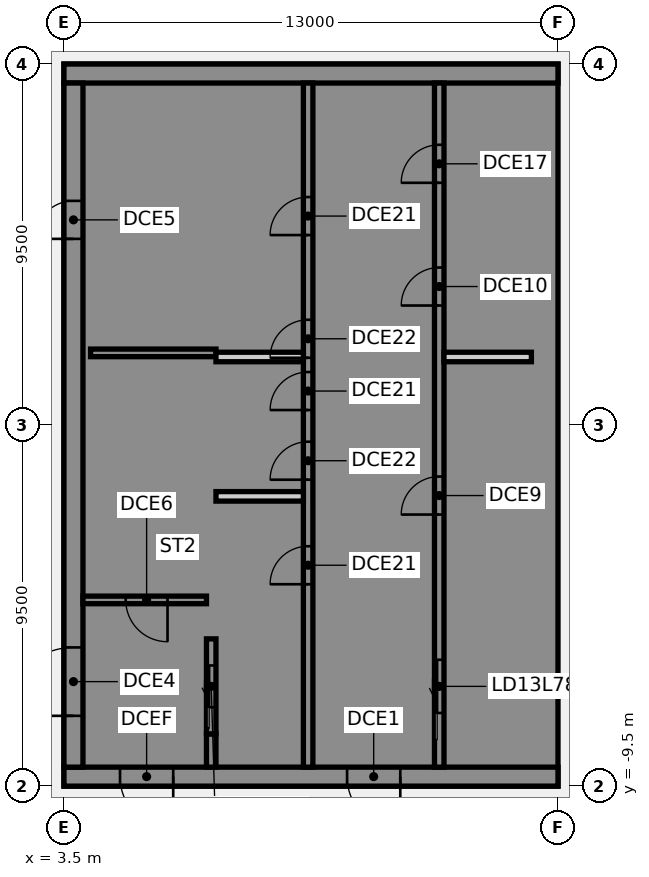
"""IFC4 building model, lengths in metres.
Left out: names, types, materials, properties, quantities, classifications, styles, units other than length and angle.
Written with IfcOpenShell. Run it as: python <this file> out.ifc"""

import sys

from ifc_helpers import new_model, si_unit, direction, frame, frame_2d, origin, place, context, subcontext, project, spatial, polyline, rectangle, outline, extrude, element, fill, save


model = new_model("IFC4")
c1 = context("Model", 3, precision=1e-05, world=origin(), true_north=direction((0.0, 1.0)))
c2 = subcontext(c1, "Body", "Model", "MODEL_VIEW")
j1 = project(units=[si_unit("LENGTHUNIT", "METRE"), si_unit("PLANEANGLEUNIT", "RADIAN")], contexts=[c1])
p1 = place(None, origin())
s1 = spatial("IfcSite", under=j1, at=p1, CompositionType="ELEMENT")
p2 = place(p1, origin())
s2 = spatial("IfcBuilding", under=s1, at=p2, CompositionType="ELEMENT")
p3 = place(p2, frame((0.0, 0.0, 317.4)))
s3 = spatial("IfcBuildingStorey", under=s2, at=p3, CompositionType="ELEMENT", Elevation=317.4)
p4 = place(p3, frame((16.5, -9.25, 0.0), z_axis=(0.0, 0.0, 1.0), x_axis=(-1.0, 0.0, 0.0)))
e1 = element("IfcWall", 1, at=p4, inside=s3, PredefinedType="SHEAR", context=c2, shape_type="SweptSolid", body=[
    extrude(rectangle(XDim=13.0, YDim=0.5, at=frame_2d((6.5, 0.0))), origin(), (0.0, 0.0, 1.0), 3.82),
])
p5 = place(p4, frame((4.15, 0.0, 0.0)))
e2 = element("IfcOpeningElement", 2, at=p5, cuts=e1, PredefinedType="OPENING", context=c2, shape_type="SweptSolid", body=[
    extrude(rectangle(XDim=1.4, YDim=2.1, at=frame_2d((0.7, 1.05))), frame((0.0, 0.26, 0.0), z_axis=(0.0, -1.0, 0.0), x_axis=(1.0, 0.0, 0.0)), (0.0, 0.0, 1.0), 0.52),
])
p6 = place(p4, frame((10.125, 0.0, 0.0)))
e3 = element("IfcOpeningElement", 3, at=p6, cuts=e1, PredefinedType="OPENING", context=c2, shape_type="SweptSolid", body=[
    extrude(rectangle(XDim=1.4, YDim=2.1, at=frame_2d((0.7, 1.05))), frame((0.0, 0.26, 0.0), z_axis=(0.0, -1.0, 0.0), x_axis=(1.0, 0.0, 0.0)), (0.0, 0.0, 1.0), 0.52),
])
p7 = place(p3, origin())
e4 = element("IfcWall", 4, at=p7, inside=s3, PredefinedType="SHEAR", context=c2, shape_type="SweptSolid", body=[
    extrude(outline(polyline([(13.5, -8.125), (13.5, -9.0), (16.0, -9.0), (16.5, -9.0), (16.5, 9.0), (16.0, 9.0), (13.5, 9.0), (13.5, 8.125), (16.0, 8.125), (16.0, -5.375), (13.5, -5.375), (13.5, -5.625), (16.0, -5.625), (16.0, -8.125), (13.5, -8.125)])), origin(), (0.0, 0.0, 1.0), 3.82),
])
p8 = place(p3, frame((16.5, 9.25, 0.0), z_axis=(0.0, 0.0, 1.0), x_axis=(-1.0, 0.0, 0.0)))
e5 = element("IfcWall", 5, at=p8, inside=s3, PredefinedType="SHEAR", context=c2, shape_type="SweptSolid", body=[
    extrude(rectangle(XDim=13.0, YDim=0.5, at=frame_2d((6.5, 0.0))), origin(), (0.0, 0.0, 1.0), 3.82),
])
p9 = place(p3, origin())
e6 = element("IfcWall", 6, at=p9, inside=s3, PredefinedType="SHEAR", context=c2, shape_type="SweptSolid", body=[
    extrude(outline(polyline([(9.8, -5.625), (9.8, -5.375), (7.5, -5.375), (7.5, 8.125), (9.8, 8.125), (9.8, 9.0), (7.5, 9.0), (7.25, 9.0), (7.25, -5.625), (7.5, -5.625), (9.8, -5.625)])), origin(), (0.0, 0.0, 1.0), 3.82),
])
p10 = place(p3, origin())
e7 = element("IfcWall", 7, at=p10, inside=s3, PredefinedType="SHEAR", context=c2, shape_type="SweptSolid", body=[
    extrude(outline(polyline([(7.5, -8.125), (7.5, -9.0), (9.8, -9.0), (9.8, -8.125), (9.8, -5.625), (9.55, -5.625), (9.55, -8.125), (7.5, -8.125)])), origin(), (0.0, 0.0, 1.0), 3.82),
])
p11 = place(p3, frame((7.375, -9.0, 0.0), z_axis=(0.0, 0.0, 1.0), x_axis=(0.0, 1.0, 0.0)))
e8 = element("IfcWall", 8, at=p11, inside=s3, PredefinedType="SHEAR", context=c2, shape_type="SweptSolid", body=[
    extrude(rectangle(XDim=0.875, YDim=0.25, at=frame_2d((0.438, 0.0))), origin(), (0.0, 0.0, 1.0), 3.82),
])
p12 = place(p3, frame((7.5, 1.9, 0.0), z_axis=(0.0, 0.0, 1.0), x_axis=(-1.0, 0.0, 0.0)))
e9 = element("IfcWall", 9, at=p12, inside=s3, PredefinedType="SHEAR", context=c2, shape_type="SweptSolid", body=[
    extrude(rectangle(XDim=3.3, YDim=0.2, at=frame_2d((1.65, 0.0))), origin(), (0.0, 0.0, 1.0), 3.82),
])
p13 = place(p3, frame((13.375, -9.0, 0.0), z_axis=(0.0, 0.0, 1.0), x_axis=(0.0, 1.0, 0.0)))
e10 = element("IfcWall", 10, at=p13, inside=s3, PredefinedType="SHEAR", context=c2, shape_type="SweptSolid", body=[
    extrude(rectangle(XDim=18.0, YDim=0.25, at=frame_2d((9.0, 0.0))), origin(), (0.0, 0.0, 1.0), 3.82),
])
p14 = place(p13, frame((1.425, 0.0, 0.0)))
e11 = element("IfcOpeningElement", 11, at=p14, cuts=e10, PredefinedType="OPENING", context=c2, shape_type="SweptSolid", body=[
    extrude(rectangle(XDim=1.4, YDim=2.1, at=frame_2d((0.7, 1.05))), frame((0.0, 0.135, 0.0), z_axis=(0.0, -1.0, 0.0), x_axis=(1.0, 0.0, 0.0)), (0.0, 0.0, 1.0), 0.27),
])
p15 = place(p13, frame((6.646, 0.0, 0.0)))
e12 = element("IfcOpeningElement", 12, at=p15, cuts=e10, PredefinedType="OPENING", context=c2, shape_type="SweptSolid", body=[
    extrude(rectangle(XDim=1.0, YDim=2.1, at=frame_2d((0.5, 1.05))), frame((0.0, 0.135, 0.0), z_axis=(0.0, -1.0, 0.0), x_axis=(1.0, 0.0, 0.0)), (0.0, 0.0, 1.0), 0.27),
])
p16 = place(p13, frame((12.146, 0.0, 0.0)))
e13 = element("IfcOpeningElement", 13, at=p16, cuts=e10, PredefinedType="OPENING", context=c2, shape_type="SweptSolid", body=[
    extrude(rectangle(XDim=1.0, YDim=2.1, at=frame_2d((0.5, 1.05))), frame((0.0, 0.135, 0.0), z_axis=(0.0, -1.0, 0.0), x_axis=(1.0, 0.0, 0.0)), (0.0, 0.0, 1.0), 0.27),
])
p17 = place(p13, frame((15.375, 0.0, 0.0)))
e14 = element("IfcOpeningElement", 14, at=p17, cuts=e10, PredefinedType="OPENING", context=c2, shape_type="SweptSolid", body=[
    extrude(rectangle(XDim=1.0, YDim=2.1, at=frame_2d((0.5, 1.05))), frame((0.0, 0.135, 0.0), z_axis=(0.0, -1.0, 0.0), x_axis=(1.0, 0.0, 0.0)), (0.0, 0.0, 1.0), 0.27),
])
p18 = place(p3, frame((9.925, -9.0, 0.0), z_axis=(0.0, 0.0, 1.0), x_axis=(0.0, 1.0, 0.0)))
e15 = element("IfcWall", 15, at=p18, inside=s3, PredefinedType="SHEAR", context=c2, shape_type="SweptSolid", body=[
    extrude(rectangle(XDim=18.0, YDim=0.25, at=frame_2d((9.0, 0.0))), origin(), (0.0, 0.0, 1.0), 3.82),
])
p19 = place(p18, frame((4.812, 0.0, 0.0)))
e16 = element("IfcOpeningElement", 16, at=p19, cuts=e15, PredefinedType="OPENING", context=c2, shape_type="SweptSolid", body=[
    extrude(rectangle(XDim=1.0, YDim=2.1, at=frame_2d((0.5, 1.05))), frame((0.0, 0.135, 0.0), z_axis=(0.0, -1.0, 0.0), x_axis=(1.0, 0.0, 0.0)), (0.0, 0.0, 1.0), 0.27),
])
p20 = place(p18, frame((7.562, 0.0, 0.0)))
e17 = element("IfcOpeningElement", 17, at=p20, cuts=e15, PredefinedType="OPENING", context=c2, shape_type="SweptSolid", body=[
    extrude(rectangle(XDim=1.0, YDim=2.1, at=frame_2d((0.5, 1.05))), frame((0.0, 0.135, 0.0), z_axis=(0.0, -1.0, 0.0), x_axis=(1.0, 0.0, 0.0)), (0.0, 0.0, 1.0), 0.27),
])
p21 = place(p18, frame((9.396, 0.0, 0.0)))
e18 = element("IfcOpeningElement", 18, at=p21, cuts=e15, PredefinedType="OPENING", context=c2, shape_type="SweptSolid", body=[
    extrude(rectangle(XDim=1.0, YDim=2.1, at=frame_2d((0.5, 1.05))), frame((0.0, 0.135, 0.0), z_axis=(0.0, -1.0, 0.0), x_axis=(1.0, 0.0, 0.0)), (0.0, 0.0, 1.0), 0.27),
])
p22 = place(p18, frame((10.771, 0.0, 0.0)))
e19 = element("IfcOpeningElement", 19, at=p22, cuts=e15, PredefinedType="OPENING", context=c2, shape_type="SweptSolid", body=[
    extrude(rectangle(XDim=1.0, YDim=2.1, at=frame_2d((0.5, 1.05))), frame((0.0, 0.135, 0.0), z_axis=(0.0, -1.0, 0.0), x_axis=(1.0, 0.0, 0.0)), (0.0, 0.0, 1.0), 0.27),
])
p23 = place(p18, frame((14.0, 0.0, 0.0)))
e20 = element("IfcOpeningElement", 20, at=p23, cuts=e15, PredefinedType="OPENING", context=c2, shape_type="SweptSolid", body=[
    extrude(rectangle(XDim=1.0, YDim=2.1, at=frame_2d((0.5, 1.05))), frame((0.0, 0.135, 0.0), z_axis=(0.0, -1.0, 0.0), x_axis=(1.0, 0.0, 0.0)), (0.0, 0.0, 1.0), 0.27),
])
p24 = place(p3, frame((7.375, -8.125, 0.0), z_axis=(0.0, 0.0, 1.0), x_axis=(0.0, 1.0, 0.0)))
e21 = element("IfcWall", 21, at=p24, inside=s3, PredefinedType="SHEAR", context=c2, shape_type="SweptSolid", body=[
    extrude(rectangle(XDim=2.5, YDim=0.25, at=frame_2d((1.25, 0.0))), origin(), (0.0, 0.0, 1.0), 3.82),
])
p25 = place(p24, frame((0.7, 0.0, 0.0)))
e22 = element("IfcOpeningElement", 22, at=p25, cuts=e21, PredefinedType="OPENING", context=c2, shape_type="SweptSolid", body=[
    extrude(rectangle(XDim=1.1, YDim=2.1, at=frame_2d((0.55, 1.05))), frame((0.0, 0.135, 0.0), z_axis=(0.0, -1.0, 0.0), x_axis=(1.0, 0.0, 0.0)), (0.0, 0.0, 1.0), 0.27),
])
p26 = place(p3, frame((3.75, -9.0, 0.0), z_axis=(0.0, 0.0, 1.0), x_axis=(0.0, 1.0, 0.0)))
e23 = element("IfcWall", 23, at=p26, inside=s3, PredefinedType="SHEAR", context=c2, shape_type="SweptSolid", body=[
    extrude(rectangle(XDim=18.0, YDim=0.5, at=frame_2d((9.0, 0.0))), origin(), (0.0, 0.0, 1.0), 3.82),
])
p27 = place(p26, frame((1.35, 0.0, 0.0)))
e24 = element("IfcOpeningElement", 24, at=p27, cuts=e23, PredefinedType="OPENING", context=c2, shape_type="SweptSolid", body=[
    extrude(rectangle(XDim=1.8, YDim=2.1, at=frame_2d((0.9, 1.05))), frame((0.0, 0.26, 0.0), z_axis=(0.0, -1.0, 0.0), x_axis=(1.0, 0.0, 0.0)), (0.0, 0.0, 1.0), 0.52),
])
p28 = place(p26, frame((13.9, 0.0, 0.0)))
e25 = element("IfcOpeningElement", 25, at=p28, cuts=e23, PredefinedType="OPENING", context=c2, shape_type="SweptSolid", body=[
    extrude(rectangle(XDim=1.0, YDim=2.1, at=frame_2d((0.5, 1.05))), frame((0.0, 0.26, 0.0), z_axis=(0.0, -1.0, 0.0), x_axis=(1.0, 0.0, 0.0)), (0.0, 0.0, 1.0), 0.52),
])
p29 = place(p3, frame((7.25, -4.6, 0.0), z_axis=(0.0, 0.0, 1.0), x_axis=(-1.0, 0.0, 0.0)))
e26 = element("IfcWall", 26, at=p29, inside=s3, PredefinedType="SHEAR", context=c2, shape_type="SweptSolid", body=[
    extrude(rectangle(XDim=3.25, YDim=0.2, at=frame_2d((1.625, 0.0))), origin(), (0.0, 0.0, 1.0), 3.82),
])
p30 = place(p29, frame((1.025, 0.0, 0.0)))
e27 = element("IfcOpeningElement", 27, at=p30, cuts=e26, PredefinedType="OPENING", context=c2, shape_type="SweptSolid", body=[
    extrude(rectangle(XDim=1.1, YDim=2.1, at=frame_2d((0.55, 1.05))), frame((0.0, 0.11, 0.0), z_axis=(0.0, -1.0, 0.0), x_axis=(1.0, 0.0, 0.0)), (0.0, 0.0, 1.0), 0.22),
])
for number, where, z_axis, x_axis in (
    (28, (15.8, 1.792, 0.0), (0.0, 0.0, 1.0), (-1.0, 0.0, 0.0)),
    (29, (9.8, -1.875, 0.0), (0.0, 0.0, 1.0), (-1.0, 0.0, 0.0)),
    (30, (9.8, 1.792, 0.0), (0.0, 0.0, 1.0), (-1.0, 0.0, 0.0)),
):
    element("IfcWall", number, at=place(p3, frame(where, z_axis=z_axis, x_axis=x_axis)), inside=s3, PredefinedType="PARTITIONING", context=c2, shape_type="SweptSolid", body=[
        extrude(rectangle(XDim=2.3, YDim=0.25, at=frame_2d((1.15, 0.0))), origin(), (0.0, 0.0, 1.0), 3.82),
    ])
p31 = place(p5, origin())
e31 = element("IfcDoor", 31, at=p31, inside=s3, OperationType="SINGLE_SWING_LEFT", PredefinedType="DOOR", context=c2, shape_type="SweptSolid", body=[
    extrude(rectangle(XDim=1.4, YDim=2.1, at=frame_2d((0.7, 1.05))), frame((0.0, 0.025, 0.0), z_axis=(0.0, -1.0, 0.0), x_axis=(1.0, 0.0, 0.0)), (0.0, 0.0, 1.0), 0.05),
])
fill(e2, e31)
p32 = place(p6, origin())
e32 = element("IfcDoor", 32, at=p32, inside=s3, OperationType="SINGLE_SWING_LEFT", PredefinedType="DOOR", context=c2, shape_type="SweptSolid", body=[
    extrude(rectangle(XDim=1.4, YDim=2.1, at=frame_2d((0.7, 1.05))), frame((0.0, 0.025, 0.0), z_axis=(0.0, -1.0, 0.0), x_axis=(1.0, 0.0, 0.0)), (0.0, 0.0, 1.0), 0.05),
])
fill(e3, e32)
p33 = place(p27, origin())
e33 = element("IfcDoor", 33, at=p33, inside=s3, OperationType="SINGLE_SWING_LEFT", PredefinedType="DOOR", context=c2, shape_type="SweptSolid", body=[
    extrude(rectangle(XDim=1.8, YDim=2.1, at=frame_2d((0.9, 1.05))), frame((0.0, 0.025, 0.0), z_axis=(0.0, -1.0, 0.0), x_axis=(1.0, 0.0, 0.0)), (0.0, 0.0, 1.0), 0.05),
])
fill(e24, e33)
p34 = place(p28, origin())
e34 = element("IfcDoor", 34, at=p34, inside=s3, OperationType="SINGLE_SWING_LEFT", PredefinedType="DOOR", context=c2, shape_type="SweptSolid", body=[
    extrude(rectangle(XDim=1.0, YDim=2.1, at=frame_2d((0.5, 1.05))), frame((0.0, 0.025, 0.0), z_axis=(0.0, -1.0, 0.0), x_axis=(1.0, 0.0, 0.0)), (0.0, 0.0, 1.0), 0.05),
])
fill(e25, e34)
p35 = place(p30, origin())
e35 = element("IfcDoor", 35, at=p35, inside=s3, OperationType="SINGLE_SWING_LEFT", PredefinedType="DOOR", context=c2, shape_type="SweptSolid", body=[
    extrude(rectangle(XDim=1.1, YDim=2.1, at=frame_2d((0.55, 1.05))), frame((0.0, 0.025, 0.0), z_axis=(0.0, -1.0, 0.0), x_axis=(1.0, 0.0, 0.0)), (0.0, 0.0, 1.0), 0.05),
])
fill(e27, e35)
p36 = place(p14, origin())
e36 = element("IfcDoor", 36, at=p36, inside=s3, OperationType="SLIDING_TO_LEFT", PredefinedType="DOOR", context=c2, shape_type="SweptSolid", body=[
    extrude(rectangle(XDim=1.4, YDim=2.1, at=frame_2d((0.7, 1.05))), frame((0.0, 0.025, 0.0), z_axis=(0.0, -1.0, 0.0), x_axis=(1.0, 0.0, 0.0)), (0.0, 0.0, 1.0), 0.05),
])
fill(e11, e36)
p37 = place(p25, origin())
e37 = element("IfcDoor", 37, at=p37, inside=s3, OperationType="SLIDING_TO_LEFT", PredefinedType="DOOR", context=c2, shape_type="SweptSolid", body=[
    extrude(rectangle(XDim=1.1, YDim=2.1, at=frame_2d((0.55, 1.05))), frame((0.0, 0.025, 0.0), z_axis=(0.0, -1.0, 0.0), x_axis=(1.0, 0.0, 0.0)), (0.0, 0.0, 1.0), 0.05),
])
fill(e22, e37)
p38 = place(p15, origin())
e38 = element("IfcDoor", 38, at=p38, inside=s3, OperationType="SINGLE_SWING_LEFT", PredefinedType="DOOR", context=c2, shape_type="SweptSolid", body=[
    extrude(rectangle(XDim=1.0, YDim=2.1, at=frame_2d((0.5, 1.05))), frame((0.0, 0.025, 0.0), z_axis=(0.0, -1.0, 0.0), x_axis=(1.0, 0.0, 0.0)), (0.0, 0.0, 1.0), 0.05),
])
fill(e12, e38)
p39 = place(p16, origin())
e39 = element("IfcDoor", 39, at=p39, inside=s3, OperationType="SINGLE_SWING_LEFT", PredefinedType="DOOR", context=c2, shape_type="SweptSolid", body=[
    extrude(rectangle(XDim=1.0, YDim=2.1, at=frame_2d((0.5, 1.05))), frame((0.0, 0.025, 0.0), z_axis=(0.0, -1.0, 0.0), x_axis=(1.0, 0.0, 0.0)), (0.0, 0.0, 1.0), 0.05),
])
fill(e13, e39)
p40 = place(p17, origin())
e40 = element("IfcDoor", 40, at=p40, inside=s3, OperationType="SINGLE_SWING_LEFT", PredefinedType="DOOR", context=c2, shape_type="SweptSolid", body=[
    extrude(rectangle(XDim=1.0, YDim=2.1, at=frame_2d((0.5, 1.05))), frame((0.0, 0.025, 0.0), z_axis=(0.0, -1.0, 0.0), x_axis=(1.0, 0.0, 0.0)), (0.0, 0.0, 1.0), 0.05),
])
fill(e14, e40)
p41 = place(p19, origin())
e41 = element("IfcDoor", 41, at=p41, inside=s3, OperationType="SINGLE_SWING_LEFT", PredefinedType="DOOR", context=c2, shape_type="SweptSolid", body=[
    extrude(rectangle(XDim=1.0, YDim=2.1, at=frame_2d((0.5, 1.05))), frame((0.0, 0.025, 0.0), z_axis=(0.0, -1.0, 0.0), x_axis=(1.0, 0.0, 0.0)), (0.0, 0.0, 1.0), 0.05),
])
fill(e16, e41)
p42 = place(p20, origin())
e42 = element("IfcDoor", 42, at=p42, inside=s3, OperationType="SINGLE_SWING_LEFT", PredefinedType="DOOR", context=c2, shape_type="SweptSolid", body=[
    extrude(rectangle(XDim=1.0, YDim=2.1, at=frame_2d((0.5, 1.05))), frame((0.0, 0.025, 0.0), z_axis=(0.0, -1.0, 0.0), x_axis=(1.0, 0.0, 0.0)), (0.0, 0.0, 1.0), 0.05),
])
fill(e17, e42)
p43 = place(p21, origin())
e43 = element("IfcDoor", 43, at=p43, inside=s3, OperationType="SINGLE_SWING_LEFT", PredefinedType="DOOR", context=c2, shape_type="SweptSolid", body=[
    extrude(rectangle(XDim=1.0, YDim=2.1, at=frame_2d((0.5, 1.05))), frame((0.0, 0.025, 0.0), z_axis=(0.0, -1.0, 0.0), x_axis=(1.0, 0.0, 0.0)), (0.0, 0.0, 1.0), 0.05),
])
fill(e18, e43)
p44 = place(p22, origin())
e44 = element("IfcDoor", 44, at=p44, inside=s3, OperationType="SINGLE_SWING_LEFT", PredefinedType="DOOR", context=c2, shape_type="SweptSolid", body=[
    extrude(rectangle(XDim=1.0, YDim=2.1, at=frame_2d((0.5, 1.05))), frame((0.0, 0.025, 0.0), z_axis=(0.0, -1.0, 0.0), x_axis=(1.0, 0.0, 0.0)), (0.0, 0.0, 1.0), 0.05),
])
fill(e19, e44)
p45 = place(p23, origin())
e45 = element("IfcDoor", 45, at=p45, inside=s3, OperationType="SINGLE_SWING_LEFT", PredefinedType="DOOR", context=c2, shape_type="SweptSolid", body=[
    extrude(rectangle(XDim=1.0, YDim=2.1, at=frame_2d((0.5, 1.05))), frame((0.0, 0.025, 0.0), z_axis=(0.0, -1.0, 0.0), x_axis=(1.0, 0.0, 0.0)), (0.0, 0.0, 1.0), 0.05),
])
fill(e20, e45)
save(model, sys.argv[1])
